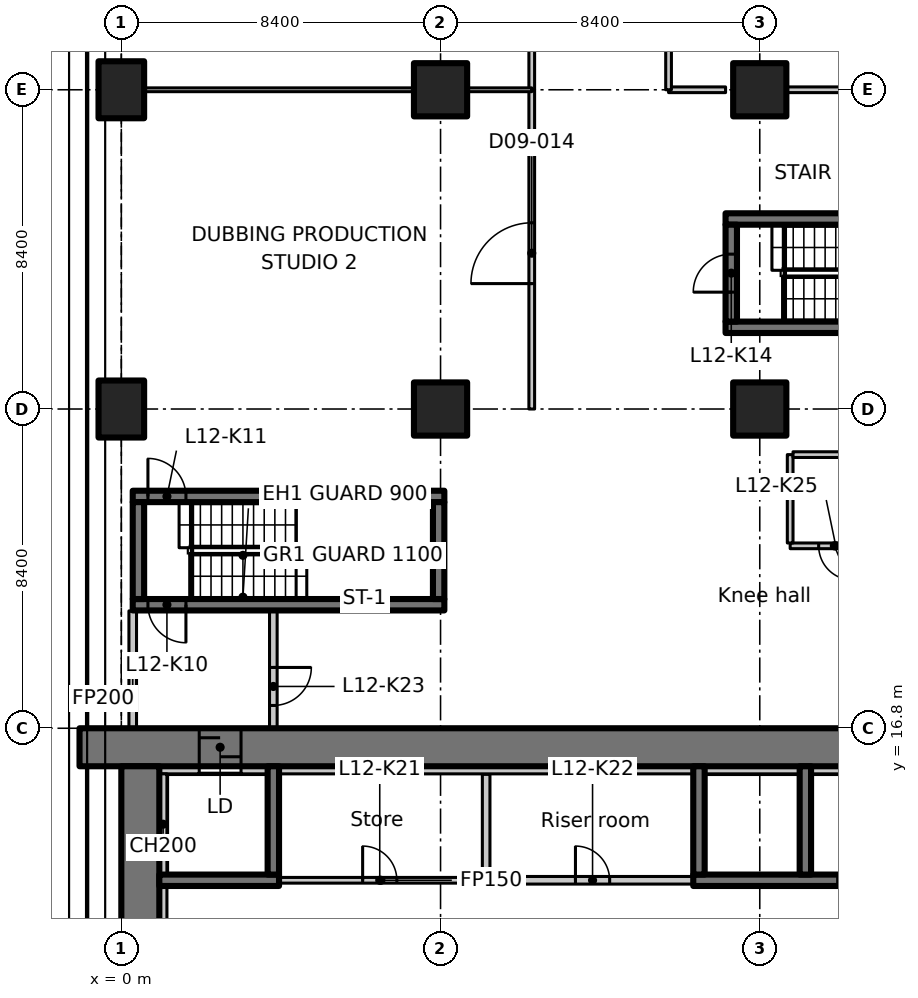
"""IFC4 building model, lengths in metres.
Left out: names, types, materials, properties, quantities, classifications, styles, units other than length and angle.
Written with IfcOpenShell. Run it as: python <this file> out.ifc"""

import sys

from ifc_helpers import new_model, si_unit, direction, frame, frame_2d, origin, origin_2d, place, context, subcontext, project, spatial, rectangle, extrude, element, fill, save


model = new_model("IFC4")
c1 = context("Model", 3, precision=1e-05, world=origin(), true_north=direction((0.0, 1.0)))
c2 = subcontext(c1, "Body", "Model", "MODEL_VIEW")
j1 = project(units=[si_unit("LENGTHUNIT", "METRE"), si_unit("PLANEANGLEUNIT", "RADIAN")], contexts=[c1])
p1 = place(None, origin())
s1 = spatial("IfcSite", under=j1, at=p1, CompositionType="ELEMENT")
p2 = place(p1, origin())
s2 = spatial("IfcBuilding", under=s1, at=p2, CompositionType="ELEMENT")
p3 = place(p2, frame((0.0, 0.0, 58.1)))
s3 = spatial("IfcBuildingStorey", under=s2, at=p3, CompositionType="ELEMENT", Elevation=58.1)
for number, where, z_axis, x_axis in (
    (1, (0.0, 25.2, 0.0), (0.0, 0.0, 1.0), (1.0, 0.0, 0.0)),
    (2, (0.0, 33.6, 0.0), (0.0, 0.0, 1.0), (1.0, 0.0, 0.0)),
):
    element("IfcColumn", number, at=place(p3, frame(where, z_axis=z_axis, x_axis=x_axis)), inside=s3, PredefinedType="COLUMN", context=c2, shape_type="SweptSolid", body=[
        extrude(rectangle(XDim=1.2, YDim=1.5, at=origin_2d()), origin(), (0.0, 0.0, 1.0), 3.35),
    ])
for number, where, z_axis, x_axis in (
    (3, (8.4, 25.2, 0.0), (0.0, 0.0, 1.0), (1.0, 0.0, 0.0)),
    (4, (8.4, 33.6, 0.0), (0.0, 0.0, 1.0), (1.0, 0.0, 0.0)),
    (5, (16.8, 25.2, 0.0), (0.0, 0.0, 1.0), (1.0, 0.0, 0.0)),
    (6, (16.8, 33.6, 0.0), (0.0, 0.0, 1.0), (1.0, 0.0, 0.0)),
):
    element("IfcColumn", number, at=place(p3, frame(where, z_axis=z_axis, x_axis=x_axis)), inside=s3, PredefinedType="COLUMN", context=c2, shape_type="SweptSolid", body=[
        extrude(rectangle(XDim=1.4, YDim=1.4, at=origin_2d()), origin(), (0.0, 0.0, 1.0), 3.35),
    ])
p4 = place(p3, frame((-1.1, 16.3, 0.0), z_axis=(0.0, 0.0, 1.0), x_axis=(1.0, 0.0, 0.0)))
e7 = element("IfcWall", 7, at=p4, inside=s3, PredefinedType="SHEAR", context=c2, shape_type="SweptSolid", body=[
    extrude(rectangle(XDim=22.1, YDim=1.0, at=frame_2d((11.05, 0.0))), origin(), (0.0, 0.0, 1.0), 3.35),
])
p5 = place(p4, frame((3.15, 0.0, 0.0)))
e8 = element("IfcOpeningElement", 8, at=p5, cuts=e7, PredefinedType="OPENING", context=c2, shape_type="SweptSolid", body=[
    extrude(rectangle(XDim=1.1, YDim=2.3, at=frame_2d((0.55, 1.15))), frame((0.0, 0.51, 0.0), z_axis=(0.0, -1.0, 0.0), x_axis=(1.0, 0.0, 0.0)), (0.0, 0.0, 1.0), 1.02),
])
p6 = place(p3, frame((0.5, 6.936, 0.0), z_axis=(0.0, 0.0, 1.0), x_axis=(0.0, 1.0, 0.0)))
e9 = element("IfcWall", 9, at=p6, inside=s3, PredefinedType="SHEAR", context=c2, shape_type="SweptSolid", body=[
    extrude(rectangle(XDim=8.864, YDim=1.0, at=frame_2d((4.432, 0.0))), origin(), (0.0, 0.0, 1.0), 3.35),
])
p7 = place(p3, frame((1.0, 15.7, 0.0), z_axis=(0.0, 0.0, 1.0), x_axis=(1.0, 0.0, 0.0)))
e10 = element("IfcWall", 10, at=p7, inside=s3, PredefinedType="PARTITIONING", context=c2, shape_type="SweptSolid", body=[
    extrude(rectangle(XDim=1.05, YDim=0.2, at=frame_2d((0.525, 0.0))), origin(), (0.0, 0.0, 1.0), 3.35),
])
p8 = place(p3, frame((1.0, 12.8, 0.0), z_axis=(0.0, 0.0, 1.0), x_axis=(1.0, 0.0, 0.0)))
e11 = element("IfcWall", 11, at=p8, inside=s3, PredefinedType="SHEAR", context=c2, shape_type="SweptSolid", body=[
    extrude(rectangle(XDim=3.15, YDim=0.3, at=frame_2d((1.575, 0.0))), origin(), (0.0, 0.0, 1.0), 3.35),
])
p9 = place(p3, frame((4.0, 12.95, 0.0), z_axis=(0.0, 0.0, 1.0), x_axis=(0.0, 1.0, 0.0)))
e12 = element("IfcWall", 12, at=p9, inside=s3, PredefinedType="SHEAR", context=c2, shape_type="SweptSolid", body=[
    extrude(rectangle(XDim=2.85, YDim=0.3, at=frame_2d((1.425, 0.0))), origin(), (0.0, 0.0, 1.0), 3.35),
])
p10 = place(p3, frame((15.05, 12.8, 0.0), z_axis=(0.0, 0.0, 1.0), x_axis=(1.0, 0.0, 0.0)))
e13 = element("IfcWall", 13, at=p10, inside=s3, PredefinedType="SHEAR", context=c2, shape_type="SweptSolid", body=[
    extrude(rectangle(XDim=5.9, YDim=0.3, at=frame_2d((2.95, 0.0))), origin(), (0.0, 0.0, 1.0), 3.35),
])
p11 = place(p10, frame((3.8, 0.0, 0.0)))
e14 = element("IfcOpeningElement", 14, at=p11, cuts=e13, PredefinedType="OPENING", context=c2, shape_type="SweptSolid", body=[
    extrude(rectangle(XDim=1.1, YDim=2.3, at=frame_2d((0.55, 1.15))), frame((0.0, 0.16, 0.0), z_axis=(0.0, -1.0, 0.0), x_axis=(1.0, 0.0, 0.0)), (0.0, 0.0, 1.0), 0.32),
])
for number, where, z_axis, x_axis in (
    (15, (15.2, 12.95, 0.0), (0.0, 0.0, 1.0), (0.0, 1.0, 0.0)),
    (16, (18.0, 12.95, 0.0), (0.0, 0.0, 1.0), (0.0, 1.0, 0.0)),
):
    element("IfcWall", number, at=place(p3, frame(where, z_axis=z_axis, x_axis=x_axis)), inside=s3, PredefinedType="SHEAR", context=c2, shape_type="SweptSolid", body=[
        extrude(rectangle(XDim=2.85, YDim=0.3, at=frame_2d((1.425, 0.0))), origin(), (0.0, 0.0, 1.0), 3.35),
    ])
p12 = place(p3, frame((8.5, 20.05, 0.0), z_axis=(0.0, 0.0, 1.0), x_axis=(-1.0, 0.0, 0.0)))
e17 = element("IfcWall", 17, at=p12, inside=s3, PredefinedType="SHEAR", context=c2, shape_type="SweptSolid", body=[
    extrude(rectangle(XDim=8.2, YDim=0.3, at=frame_2d((4.1, 0.0))), origin(), (0.0, 0.0, 1.0), 3.35),
])
p13 = place(p12, frame((6.8, 0.0, 0.0)))
e18 = element("IfcOpeningElement", 18, at=p13, cuts=e17, PredefinedType="OPENING", context=c2, shape_type="SweptSolid", body=[
    extrude(rectangle(XDim=1.0, YDim=2.1, at=frame_2d((0.5, 1.05))), frame((0.0, 0.16, 0.0), z_axis=(0.0, -1.0, 0.0), x_axis=(1.0, 0.0, 0.0)), (0.0, 0.0, 1.0), 0.32),
])
p14 = place(p3, frame((0.3, 22.9, 0.0), z_axis=(0.0, 0.0, 1.0), x_axis=(1.0, 0.0, 0.0)))
e19 = element("IfcWall", 19, at=p14, inside=s3, PredefinedType="SHEAR", context=c2, shape_type="SweptSolid", body=[
    extrude(rectangle(XDim=8.2, YDim=0.3, at=frame_2d((4.1, 0.0))), origin(), (0.0, 0.0, 1.0), 3.35),
])
p15 = place(p14, frame((0.4, 0.0, 0.0)))
e20 = element("IfcOpeningElement", 20, at=p15, cuts=e19, PredefinedType="OPENING", context=c2, shape_type="SweptSolid", body=[
    extrude(rectangle(XDim=1.0, YDim=2.1, at=frame_2d((0.5, 1.05))), frame((0.0, 0.16, 0.0), z_axis=(0.0, -1.0, 0.0), x_axis=(1.0, 0.0, 0.0)), (0.0, 0.0, 1.0), 0.32),
])
for number, where, z_axis, x_axis in (
    (21, (0.45, 20.2, 0.0), (0.0, 0.0, 1.0), (0.0, 1.0, 0.0)),
    (22, (8.35, 20.2, 0.0), (0.0, 0.0, 1.0), (0.0, 1.0, 0.0)),
):
    element("IfcWall", number, at=place(p3, frame(where, z_axis=z_axis, x_axis=x_axis)), inside=s3, PredefinedType="SHEAR", context=c2, shape_type="SweptSolid", body=[
        extrude(rectangle(XDim=2.55, YDim=0.3, at=frame_2d((1.275, 0.0))), origin(), (0.0, 0.0, 1.0), 3.35),
    ])
for number, where, z_axis, x_axis in (
    (23, (15.9, 27.35, 0.0), (0.0, 0.0, 1.0), (1.0, 0.0, 0.0)),
    (24, (15.9, 30.2, 0.0), (0.0, 0.0, 1.0), (1.0, 0.0, 0.0)),
):
    element("IfcWall", number, at=place(p3, frame(where, z_axis=z_axis, x_axis=x_axis)), inside=s3, PredefinedType="SHEAR", context=c2, shape_type="SweptSolid", body=[
        extrude(rectangle(XDim=8.2, YDim=0.3, at=frame_2d((4.1, 0.0))), origin(), (0.0, 0.0, 1.0), 3.35),
    ])
p16 = place(p3, frame((16.05, 27.5, 0.0), z_axis=(0.0, 0.0, 1.0), x_axis=(0.0, 1.0, 0.0)))
e25 = element("IfcWall", 25, at=p16, inside=s3, PredefinedType="SHEAR", context=c2, shape_type="SweptSolid", body=[
    extrude(rectangle(XDim=2.55, YDim=0.3, at=frame_2d((1.275, 0.0))), origin(), (0.0, 0.0, 1.0), 3.35),
])
p17 = place(p16, frame((0.775, 0.0, 0.0)))
e26 = element("IfcOpeningElement", 26, at=p17, cuts=e25, PredefinedType="OPENING", context=c2, shape_type="SweptSolid", body=[
    extrude(rectangle(XDim=1.0, YDim=2.1, at=frame_2d((0.5, 1.05))), frame((0.0, 0.16, 0.0), z_axis=(0.0, -1.0, 0.0), x_axis=(1.0, 0.0, 0.0)), (0.0, 0.0, 1.0), 0.32),
])
p18 = place(p3, frame((0.3, 16.812, 0.0), z_axis=(0.0, 0.0, 1.0), x_axis=(0.0, 1.0, 0.0)))
e27 = element("IfcWall", 27, at=p18, inside=s3, PredefinedType="PARTITIONING", context=c2, shape_type="SweptSolid", body=[
    extrude(rectangle(XDim=3.076, YDim=0.2, at=frame_2d((1.538, 0.0))), origin(), (0.0, 0.0, 1.0), 2.98),
])
p19 = place(p3, frame((4.0, 19.888, 0.0), z_axis=(0.0, 0.0, 1.0), x_axis=(0.0, -1.0, 0.0)))
e28 = element("IfcWall", 28, at=p19, inside=s3, PredefinedType="PARTITIONING", context=c2, shape_type="SweptSolid", body=[
    extrude(rectangle(XDim=3.076, YDim=0.2, at=frame_2d((1.538, 0.0))), origin(), (0.0, 0.0, 1.0), 3.35),
])
p20 = place(p19, frame((1.488, 0.0, 0.0)))
e29 = element("IfcOpeningElement", 29, at=p20, cuts=e28, PredefinedType="OPENING", context=c2, shape_type="SweptSolid", body=[
    extrude(rectangle(XDim=1.0, YDim=2.1, at=frame_2d((0.5, 1.05))), frame((0.0, 0.11, 0.0), z_axis=(0.0, -1.0, 0.0), x_axis=(1.0, 0.0, 0.0)), (0.0, 0.0, 1.0), 0.22),
])
p21 = place(p3, frame((9.6, 15.588, 0.0), z_axis=(0.0, 0.0, 1.0), x_axis=(0.0, -1.0, 0.0)))
e30 = element("IfcWall", 30, at=p21, inside=s3, PredefinedType="PARTITIONING", context=c2, shape_type="SweptSolid", body=[
    extrude(rectangle(XDim=2.788, YDim=0.2, at=frame_2d((1.394, 0.0))), origin(), (0.0, 0.0, 1.0), 3.35),
])
p22 = place(p3, frame((9.7, 12.8, 0.0), z_axis=(0.0, 0.0, 1.0), x_axis=(1.0, 0.0, 0.0)))
e31 = element("IfcWall", 31, at=p22, inside=s3, PredefinedType="PARTITIONING", context=c2, shape_type="SweptSolid", body=[
    extrude(rectangle(XDim=5.338, YDim=0.2, at=frame_2d((2.669, 0.0))), origin(), (0.0, 0.0, 1.0), 3.35),
])
p23 = place(p22, frame((2.25, 0.0, 0.0)))
e32 = element("IfcOpeningElement", 32, at=p23, cuts=e31, PredefinedType="OPENING", context=c2, shape_type="SweptSolid", body=[
    extrude(rectangle(XDim=0.9, YDim=2.1, at=frame_2d((0.45, 1.05))), frame((0.0, 0.11, 0.0), z_axis=(0.0, -1.0, 0.0), x_axis=(1.0, 0.0, 0.0)), (0.0, 0.0, 1.0), 0.22),
])
p24 = place(p3, frame((4.162, 12.8, 0.0), z_axis=(0.0, 0.0, 1.0), x_axis=(1.0, 0.0, 0.0)))
e33 = element("IfcWall", 33, at=p24, inside=s3, PredefinedType="PARTITIONING", context=c2, shape_type="SweptSolid", body=[
    extrude(rectangle(XDim=5.338, YDim=0.15, at=frame_2d((2.669, 0.0))), origin(), (0.0, 0.0, 1.0), 3.35),
])
p25 = place(p24, frame((2.188, 0.0, 0.0)))
e34 = element("IfcOpeningElement", 34, at=p25, cuts=e33, PredefinedType="OPENING", context=c2, shape_type="SweptSolid", body=[
    extrude(rectangle(XDim=0.9, YDim=2.1, at=frame_2d((0.45, 1.05))), frame((0.0, 0.085, 0.0), z_axis=(0.0, -1.0, 0.0), x_axis=(1.0, 0.0, 0.0)), (0.0, 0.0, 1.0), 0.17),
])
p26 = place(p3, frame((19.925, 21.6, 0.0), z_axis=(0.0, 0.0, 1.0), x_axis=(-1.0, 0.0, 0.0)))
e35 = element("IfcWall", 35, at=p26, inside=s3, PredefinedType="PARTITIONING", context=c2, shape_type="SweptSolid", body=[
    extrude(rectangle(XDim=2.325, YDim=0.15, at=frame_2d((1.163, 0.0))), origin(), (0.0, 0.0, 1.0), 3.35),
])
p27 = place(p26, frame((0.675, 0.0, 0.0)))
e36 = element("IfcOpeningElement", 36, at=p27, cuts=e35, PredefinedType="OPENING", context=c2, shape_type="SweptSolid", body=[
    extrude(rectangle(XDim=0.9, YDim=2.1, at=frame_2d((0.45, 1.05))), frame((0.0, 0.085, 0.0), z_axis=(0.0, -1.0, 0.0), x_axis=(1.0, 0.0, 0.0)), (0.0, 0.0, 1.0), 0.17),
])
p28 = place(p3, frame((17.6, 21.675, 0.0), z_axis=(0.0, 0.0, 1.0), x_axis=(0.0, 1.0, 0.0)))
e37 = element("IfcWall", 37, at=p28, inside=s3, PredefinedType="PARTITIONING", context=c2, shape_type="SweptSolid", body=[
    extrude(rectangle(XDim=2.325, YDim=0.15, at=frame_2d((1.163, 0.0))), origin(), (0.0, 0.0, 1.0), 3.35),
])
p29 = place(p3, frame((17.675, 24.0, 0.0), z_axis=(0.0, 0.0, 1.0), x_axis=(1.0, 0.0, 0.0)))
e38 = element("IfcWall", 38, at=p29, inside=s3, PredefinedType="PARTITIONING", context=c2, shape_type="SweptSolid", body=[
    extrude(rectangle(XDim=2.25, YDim=0.15, at=frame_2d((1.125, 0.0))), origin(), (0.0, 0.0, 1.0), 3.35),
])
p30 = place(p3, frame((1.1, 9.75, 0.0), z_axis=(0.0, 0.0, 1.0), x_axis=(0.0, 1.0, 0.0)))
e39 = element("IfcWall", 39, at=p30, inside=s3, PredefinedType="PARTITIONING", context=c2, shape_type="SweptSolid", body=[
    extrude(rectangle(XDim=2.9, YDim=0.2, at=frame_2d((1.45, 0.0))), origin(), (0.0, 0.0, 1.0), 3.35),
])
p31 = place(p3, frame((1.1, 12.95, 0.0), z_axis=(0.0, 0.0, 1.0), x_axis=(0.0, 1.0, 0.0)))
e40 = element("IfcWall", 40, at=p31, inside=s3, PredefinedType="PARTITIONING", context=c2, shape_type="SweptSolid", body=[
    extrude(rectangle(XDim=2.65, YDim=0.2, at=frame_2d((1.325, 0.0))), origin(), (0.0, 0.0, 1.0), 3.35),
])
p32 = place(p3, frame((3.15, 15.7, 0.0), z_axis=(0.0, 0.0, 1.0), x_axis=(1.0, 0.0, 0.0)))
e41 = element("IfcWall", 41, at=p32, inside=s3, PredefinedType="PARTITIONING", context=c2, shape_type="SweptSolid", body=[
    extrude(rectangle(XDim=0.7, YDim=0.2, at=frame_2d((0.35, 0.0))), origin(), (0.0, 0.0, 1.0), 3.35),
])
p33 = place(p3, frame((4.15, 15.7, 0.0), z_axis=(0.0, 0.0, 1.0), x_axis=(1.0, 0.0, 0.0)))
e42 = element("IfcWall", 42, at=p33, inside=s3, PredefinedType="PARTITIONING", context=c2, shape_type="SweptSolid", body=[
    extrude(rectangle(XDim=10.9, YDim=0.2, at=frame_2d((5.45, 0.0))), origin(), (0.0, 0.0, 1.0), 3.35),
])
for number, where, z_axis, x_axis in (
    (43, (15.35, 15.7, 0.0), (0.0, 0.0, 1.0), (1.0, 0.0, 0.0)),
    (44, (18.15, 15.7, 0.0), (0.0, 0.0, 1.0), (1.0, 0.0, 0.0)),
):
    element("IfcWall", number, at=place(p3, frame(where, z_axis=z_axis, x_axis=x_axis)), inside=s3, PredefinedType="PARTITIONING", context=c2, shape_type="SweptSolid", body=[
        extrude(rectangle(XDim=2.5, YDim=0.2, at=frame_2d((1.25, 0.0))), origin(), (0.0, 0.0, 1.0), 3.35),
    ])
p34 = place(p3, frame((10.8, 25.2, 0.0), z_axis=(0.0, 0.0, 1.0), x_axis=(0.0, 1.0, 0.0)))
e45 = element("IfcWall", 45, at=p34, inside=s3, PredefinedType="PARTITIONING", context=c2, shape_type="SweptSolid", body=[
    extrude(rectangle(XDim=8.4, YDim=0.15, at=frame_2d((4.2, 0.0))), origin(), (0.0, 0.0, 1.0), 3.33),
])
p35 = place(p34, frame((3.3, 0.0, 0.0)))
e46 = element("IfcOpeningElement", 46, at=p35, cuts=e45, PredefinedType="OPENING", context=c2, shape_type="SweptSolid", body=[
    extrude(rectangle(XDim=1.6, YDim=2.1, at=frame_2d((0.8, 1.05))), frame((0.0, 0.085, 0.0), z_axis=(0.0, -1.0, 0.0), x_axis=(1.0, 0.0, 0.0)), (0.0, 0.0, 1.0), 0.17),
])
p36 = place(p3, frame((14.4, 33.6, 0.0), z_axis=(0.0, 0.0, 1.0), x_axis=(1.0, 0.0, 0.0)))
e47 = element("IfcWall", 47, at=p36, inside=s3, PredefinedType="PARTITIONING", context=c2, shape_type="SweptSolid", body=[
    extrude(rectangle(XDim=1.5, YDim=0.15, at=frame_2d((0.75, 0.0))), origin(), (0.0, 0.0, 1.0), 3.33),
])
p37 = place(p3, frame((17.52, 33.6, 0.0), z_axis=(0.0, 0.0, 1.0), x_axis=(1.0, 0.0, 0.0)))
e48 = element("IfcWall", 48, at=p37, inside=s3, PredefinedType="PARTITIONING", context=c2, shape_type="SweptSolid", body=[
    extrude(rectangle(XDim=7.06, YDim=0.15, at=frame_2d((3.53, 0.0))), origin(), (0.0, 0.0, 1.0), 3.33),
])
p38 = place(p37, frame((2.7, 0.0, 0.0)))
e49 = element("IfcOpeningElement", 49, at=p38, cuts=e48, PredefinedType="OPENING", context=c2, shape_type="SweptSolid", body=[
    extrude(rectangle(XDim=1.8, YDim=2.1, at=frame_2d((0.9, 1.05))), frame((0.0, 0.085, 0.0), z_axis=(0.0, -1.0, 0.0), x_axis=(1.0, 0.0, 0.0)), (0.0, 0.0, 1.0), 0.17),
])
p39 = place(p3, frame((10.8, 33.6, 0.0), z_axis=(0.0, 0.0, 1.0), x_axis=(0.0, 1.0, 0.0)))
e50 = element("IfcWall", 50, at=p39, inside=s3, PredefinedType="PARTITIONING", context=c2, shape_type="SweptSolid", body=[
    extrude(rectangle(XDim=8.4, YDim=0.15, at=frame_2d((4.2, 0.0))), origin(), (0.0, 0.0, 1.0), 3.33),
])
p40 = place(p39, frame((3.3, 0.0, 0.0)))
e51 = element("IfcOpeningElement", 51, at=p40, cuts=e50, PredefinedType="OPENING", context=c2, shape_type="SweptSolid", body=[
    extrude(rectangle(XDim=1.6, YDim=2.1, at=frame_2d((0.8, 1.05))), frame((0.0, 0.085, 0.0), z_axis=(0.0, -1.0, 0.0), x_axis=(1.0, 0.0, 0.0)), (0.0, 0.0, 1.0), 0.17),
])
p41 = place(p3, frame((14.4, 42.0, 0.0), z_axis=(0.0, 0.0, 1.0), x_axis=(0.0, -1.0, 0.0)))
e52 = element("IfcWall", 52, at=p41, inside=s3, PredefinedType="PARTITIONING", context=c2, shape_type="SweptSolid", body=[
    extrude(rectangle(XDim=8.4, YDim=0.15, at=frame_2d((4.2, 0.0))), origin(), (0.0, 0.0, 1.0), 3.33),
])
p42 = place(p3, frame((0.62, 33.6, 0.0), z_axis=(0.0, 0.0, 1.0), x_axis=(1.0, 0.0, 0.0)))
e53 = element("IfcWall", 53, at=p42, inside=s3, PredefinedType="PARTITIONING", context=c2, shape_type="SweptSolid", body=[
    extrude(rectangle(XDim=7.06, YDim=0.1, at=frame_2d((3.53, 0.0))), origin(), (0.0, 0.0, 1.0), 3.33),
])
p43 = place(p3, frame((9.12, 33.6, 0.0), z_axis=(0.0, 0.0, 1.0), x_axis=(1.0, 0.0, 0.0)))
e54 = element("IfcWall", 54, at=p43, inside=s3, PredefinedType="PARTITIONING", context=c2, shape_type="SweptSolid", body=[
    extrude(rectangle(XDim=1.68, YDim=0.1, at=frame_2d((0.84, 0.0))), origin(), (0.0, 0.0, 1.0), 3.33),
])
p44 = place(p5, origin())
e55 = element("IfcDoor", 55, at=p44, inside=s3, OperationType="SLIDING_TO_LEFT", PredefinedType="DOOR", context=c2, shape_type="SweptSolid", body=[
    extrude(rectangle(XDim=1.1, YDim=2.3, at=frame_2d((0.55, 1.15))), frame((0.0, 0.025, 0.0), z_axis=(0.0, -1.0, 0.0), x_axis=(1.0, 0.0, 0.0)), (0.0, 0.0, 1.0), 0.05),
])
fill(e8, e55)
p45 = place(p13, origin())
e56 = element("IfcDoor", 56, at=p45, inside=s3, OperationType="SINGLE_SWING_LEFT", PredefinedType="DOOR", context=c2, shape_type="SweptSolid", body=[
    extrude(rectangle(XDim=1.0, YDim=2.1, at=frame_2d((0.5, 1.05))), frame((0.0, 0.025, 0.0), z_axis=(0.0, -1.0, 0.0), x_axis=(1.0, 0.0, 0.0)), (0.0, 0.0, 1.0), 0.05),
])
fill(e18, e56)
p46 = place(p15, origin())
e57 = element("IfcDoor", 57, at=p46, inside=s3, OperationType="SINGLE_SWING_RIGHT", PredefinedType="DOOR", context=c2, shape_type="SweptSolid", body=[
    extrude(rectangle(XDim=1.0, YDim=2.1, at=frame_2d((0.5, 1.05))), frame((0.0, 0.025, 0.0), z_axis=(0.0, -1.0, 0.0), x_axis=(1.0, 0.0, 0.0)), (0.0, 0.0, 1.0), 0.05),
])
fill(e20, e57)
p47 = place(p17, origin())
e58 = element("IfcDoor", 58, at=p47, inside=s3, OperationType="SINGLE_SWING_LEFT", PredefinedType="DOOR", context=c2, shape_type="SweptSolid", body=[
    extrude(rectangle(XDim=1.0, YDim=2.1, at=frame_2d((0.5, 1.05))), frame((0.0, 0.025, 0.0), z_axis=(0.0, -1.0, 0.0), x_axis=(1.0, 0.0, 0.0)), (0.0, 0.0, 1.0), 0.05),
])
fill(e26, e58)
p48 = place(p25, origin())
e59 = element("IfcDoor", 59, at=p48, inside=s3, OperationType="SINGLE_SWING_RIGHT", PredefinedType="DOOR", context=c2, shape_type="SweptSolid", body=[
    extrude(rectangle(XDim=0.9, YDim=2.1, at=frame_2d((0.45, 1.05))), frame((0.0, 0.025, 0.0), z_axis=(0.0, -1.0, 0.0), x_axis=(1.0, 0.0, 0.0)), (0.0, 0.0, 1.0), 0.05),
])
fill(e34, e59)
p49 = place(p23, origin())
e60 = element("IfcDoor", 60, at=p49, inside=s3, OperationType="SINGLE_SWING_LEFT", PredefinedType="DOOR", context=c2, shape_type="SweptSolid", body=[
    extrude(rectangle(XDim=0.9, YDim=2.1, at=frame_2d((0.45, 1.05))), frame((0.0, 0.025, 0.0), z_axis=(0.0, -1.0, 0.0), x_axis=(1.0, 0.0, 0.0)), (0.0, 0.0, 1.0), 0.05),
])
fill(e32, e60)
p50 = place(p20, origin())
e61 = element("IfcDoor", 61, at=p50, inside=s3, OperationType="SINGLE_SWING_RIGHT", PredefinedType="DOOR", context=c2, shape_type="SweptSolid", body=[
    extrude(rectangle(XDim=1.0, YDim=2.1, at=frame_2d((0.5, 1.05))), frame((0.0, 0.025, 0.0), z_axis=(0.0, -1.0, 0.0), x_axis=(1.0, 0.0, 0.0)), (0.0, 0.0, 1.0), 0.05),
])
fill(e29, e61)
p51 = place(p27, origin())
e62 = element("IfcDoor", 62, at=p51, inside=s3, OperationType="SINGLE_SWING_RIGHT", PredefinedType="DOOR", context=c2, shape_type="SweptSolid", body=[
    extrude(rectangle(XDim=0.9, YDim=2.1, at=frame_2d((0.45, 1.05))), frame((0.0, 0.025, 0.0), z_axis=(0.0, -1.0, 0.0), x_axis=(1.0, 0.0, 0.0)), (0.0, 0.0, 1.0), 0.05),
])
fill(e36, e62)
p52 = place(p35, origin())
e63 = element("IfcDoor", 63, at=p52, inside=s3, OperationType="DOUBLE_DOOR_SINGLE_SWING", PredefinedType="DOOR", context=c2, shape_type="SweptSolid", body=[
    extrude(rectangle(XDim=1.6, YDim=2.1, at=frame_2d((0.8, 1.05))), frame((0.0, 0.025, 0.0), z_axis=(0.0, -1.0, 0.0), x_axis=(1.0, 0.0, 0.0)), (0.0, 0.0, 1.0), 0.05),
])
fill(e46, e63)
save(model, sys.argv[1])
